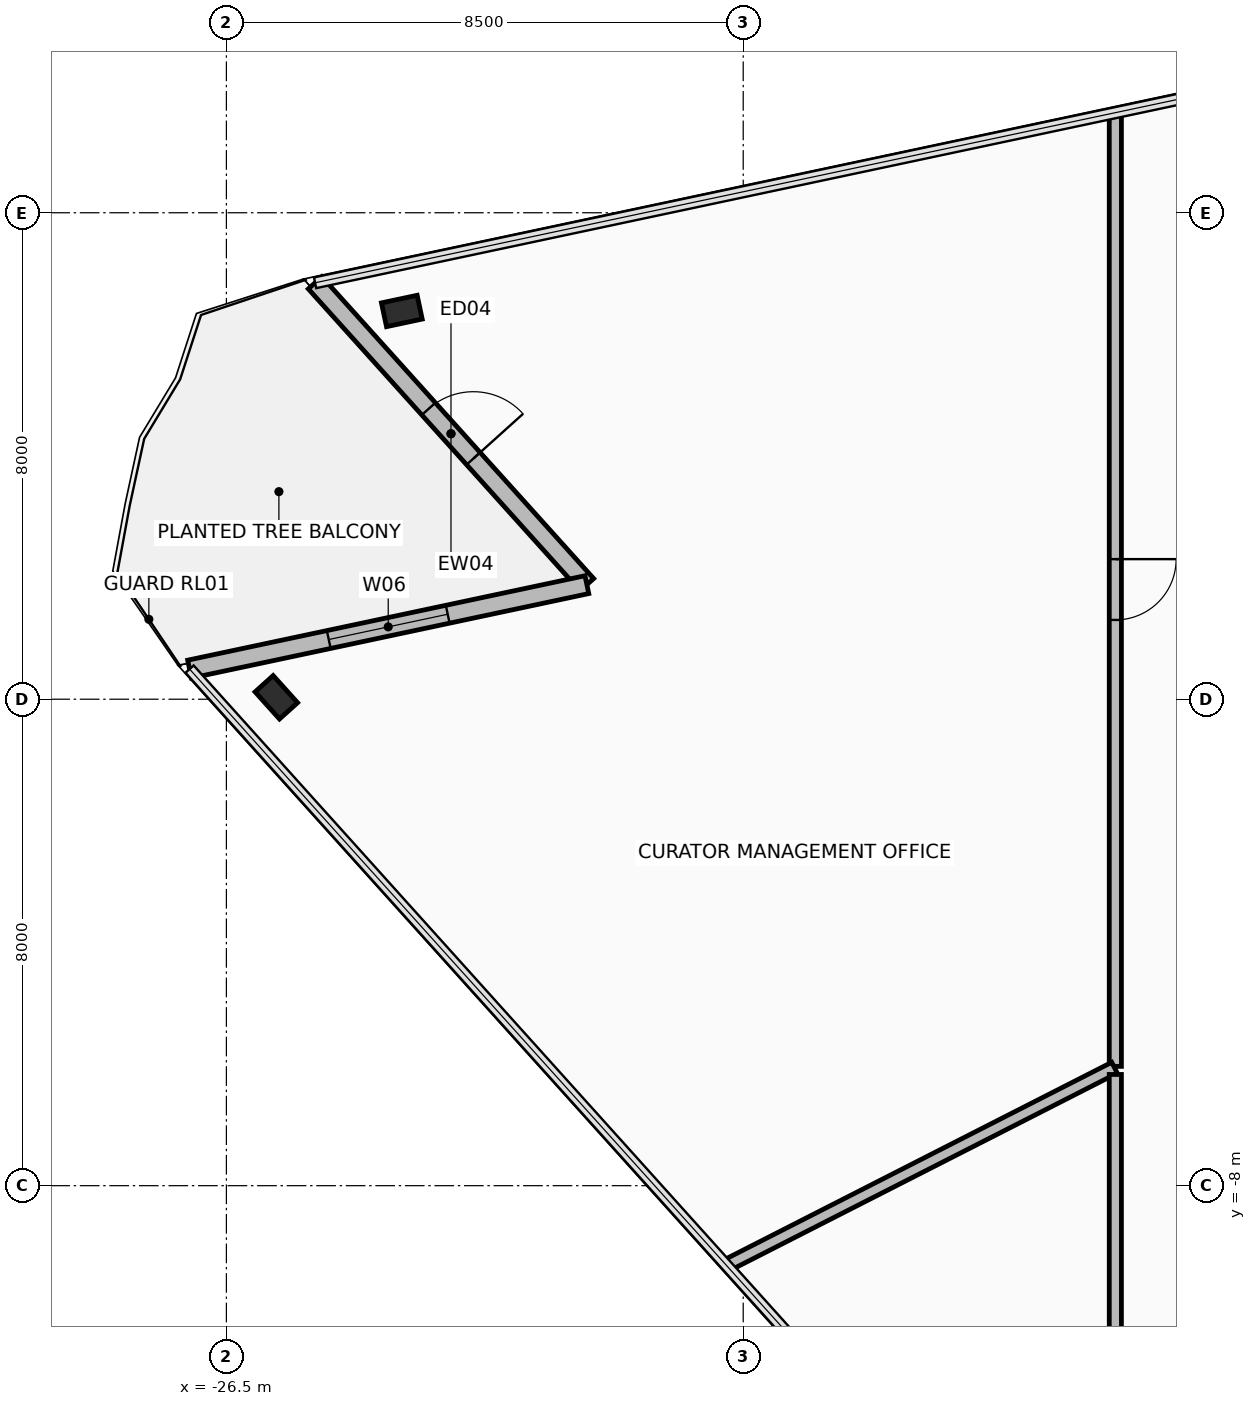
"""IFC4 building model, lengths in metres.
Left out: names, types, materials, properties, quantities, classifications, styles, units other than length and angle.
Written with IfcOpenShell. Run it as: python <this file> out.ifc"""

import sys

from ifc_helpers import new_model, si_unit, direction, frame, frame_2d, origin, origin_2d, place, context, subcontext, project, spatial, rectangle, hollow_rectangle, extrude, element, fill, save


model = new_model("IFC4")
c1 = context("Model", 3, precision=1e-05, world=origin(), true_north=direction((0.0, 1.0)))
c2 = subcontext(c1, "Body", "Model", "MODEL_VIEW")
j1 = project(units=[si_unit("LENGTHUNIT", "METRE"), si_unit("PLANEANGLEUNIT", "RADIAN")], contexts=[c1])
p1 = place(None, origin())
s1 = spatial("IfcSite", under=j1, at=p1, CompositionType="ELEMENT")
p2 = place(p1, origin())
s2 = spatial("IfcBuilding", under=s1, at=p2, CompositionType="ELEMENT")
p3 = place(p2, frame((0.0, 0.0, 298.0)))
s3 = spatial("IfcBuildingStorey", under=s2, at=p3, CompositionType="ELEMENT", Elevation=298.0)
for number, where, z_axis, x_axis in (
    (1, (-25.679, 0.032, 0.0), (0.0, 0.0, 1.0), (-0.669, 0.743, 0.0)),
    (2, (-23.615, 6.385, 0.0), (0.0, 0.0, 1.0), (0.978, 0.208, 0.0)),
):
    element("IfcColumn", number, at=place(p3, frame(where, z_axis=z_axis, x_axis=x_axis)), inside=s3, PredefinedType="COLUMN", context=c2, shape_type="SweptSolid", body=[
        extrude(hollow_rectangle(XDim=0.4, YDim=0.6, WallThickness=0.03, at=origin_2d()), origin(), (0.0, 0.0, 1.0), 4.15),
    ])
p4 = place(p3, frame((-25.041, 6.848, 0.0), z_axis=(0.0, 0.0, 1.0), x_axis=(0.669132313306, -0.743143288532, 0.0)))
e3 = element("IfcWall", 3, at=p4, inside=s3, PredefinedType="STANDARD", context=c2, shape_type="SweptSolid", body=[
    extrude(rectangle(XDim=6.68, YDim=0.3, at=frame_2d((3.34, 0.0))), origin(), (0.0, 0.0, 1.0), 3.295),
])
p5 = place(p4, frame((2.79, 0.0, 0.0)))
e4 = element("IfcOpeningElement", 4, at=p5, cuts=e3, PredefinedType="OPENING", context=c2, shape_type="SweptSolid", body=[
    extrude(rectangle(XDim=1.1, YDim=2.2, at=frame_2d((0.55, 1.1))), frame((0.0, 0.16, 0.0), z_axis=(0.0, -1.0, 0.0), x_axis=(1.0, 0.0, 0.0)), (0.0, 0.0, 1.0), 0.32),
])
p6 = place(p3, frame((-20.571, 1.884, 0.0), z_axis=(0.0, 0.0, 1.0), x_axis=(-0.978145008547, -0.207923885724, 0.0)))
e5 = element("IfcWall", 5, at=p6, inside=s3, PredefinedType="STANDARD", context=c2, shape_type="SweptSolid", body=[
    extrude(rectangle(XDim=6.68, YDim=0.3, at=frame_2d((3.34, 0.0))), origin(), (0.0, 0.0, 1.0), 3.295),
])
p7 = place(p6, frame((2.34, 0.0, 0.715)))
e6 = element("IfcOpeningElement", 6, at=p7, cuts=e5, PredefinedType="OPENING", context=c2, shape_type="SweptSolid", body=[
    extrude(rectangle(XDim=2.0, YDim=2.4, at=frame_2d((1.0, 1.2))), frame((0.0, 0.16, 0.0), z_axis=(0.0, -1.0, 0.0), x_axis=(1.0, 0.0, 0.0)), (0.0, 0.0, 1.0), 0.32),
])
p8 = place(p3, frame((-11.88, 9.646, 0.0), z_axis=(0.0, 0.0, 1.0), x_axis=(0.0, -1.0, 0.0)))
e7 = element("IfcWall", 7, at=p8, inside=s3, PredefinedType="PARTITIONING", context=c2, shape_type="SweptSolid", body=[
    extrude(rectangle(XDim=15.684, YDim=0.2, at=frame_2d((7.842, 0.0))), origin(), (0.0, 0.0, 1.0), 3.295),
])
p9 = place(p8, frame((7.342, 0.0, 0.0)))
e8 = element("IfcOpeningElement", 8, at=p9, cuts=e7, PredefinedType="OPENING", context=c2, shape_type="SweptSolid", body=[
    extrude(rectangle(XDim=1.0, YDim=2.15, at=frame_2d((0.5, 1.075))), frame((0.0, 0.11, 0.0), z_axis=(0.0, -1.0, 0.0), x_axis=(1.0, 0.0, 0.0)), (0.0, 0.0, 1.0), 0.22),
])
p10 = place(p3, frame((-11.894, -6.06, 0.0), z_axis=(0.0, 0.0, 1.0), x_axis=(-0.890996976005, -0.454009238617, 0.0)))
e9 = element("IfcWall", 9, at=p10, inside=s3, PredefinedType="PARTITIONING", context=c2, shape_type="SweptSolid", body=[
    extrude(rectangle(XDim=7.143, YDim=0.2, at=frame_2d((3.571, 0.0))), origin(), (0.0, 0.0, 1.0), 3.295),
])
p11 = place(p3, frame((-11.88, -6.171, 0.0), z_axis=(0.0, 0.0, 1.0), x_axis=(0.0, -1.0, 0.0)))
e10 = element("IfcWall", 10, at=p11, inside=s3, PredefinedType="PARTITIONING", context=c2, shape_type="SweptSolid", body=[
    extrude(rectangle(XDim=4.408, YDim=0.2, at=frame_2d((2.204, 0.0))), origin(), (0.0, 0.0, 1.0), 3.445),
])
p12 = place(p5, frame((1.1, 0.0, 0.0), z_axis=(0.0, 0.0, 1.0), x_axis=(-1.0, 0.0, 0.0)))
e11 = element("IfcDoor", 11, at=p12, inside=s3, OperationType="SINGLE_SWING_LEFT", PredefinedType="DOOR", context=c2, shape_type="SweptSolid", body=[
    extrude(rectangle(XDim=1.1, YDim=2.2, at=frame_2d((0.55, 1.1))), frame((0.0, 0.025, 0.0), z_axis=(0.0, -1.0, 0.0), x_axis=(1.0, 0.0, 0.0)), (0.0, 0.0, 1.0), 0.05),
])
fill(e4, e11)
p13 = place(p7, origin())
e12 = element("IfcWindow", 12, at=p13, inside=s3, PartitioningType="SINGLE_PANEL", PredefinedType="WINDOW", context=c2, shape_type="SweptSolid", body=[
    extrude(rectangle(XDim=2.0, YDim=2.4, at=frame_2d((1.0, 1.2))), frame((0.0, 0.03, 0.0), z_axis=(0.0, -1.0, 0.0), x_axis=(1.0, 0.0, 0.0)), (0.0, 0.0, 1.0), 0.06),
])
fill(e6, e12)
p14 = place(p9, origin())
e13 = element("IfcDoor", 13, at=p14, inside=s3, OperationType="SINGLE_SWING_RIGHT", PredefinedType="DOOR", context=c2, shape_type="SweptSolid", body=[
    extrude(rectangle(XDim=1.0, YDim=2.15, at=frame_2d((0.5, 1.075))), frame((0.0, 0.025, 0.0), z_axis=(0.0, -1.0, 0.0), x_axis=(1.0, 0.0, 0.0)), (0.0, 0.0, 1.0), 0.05),
])
fill(e8, e13)
save(model, sys.argv[1])
